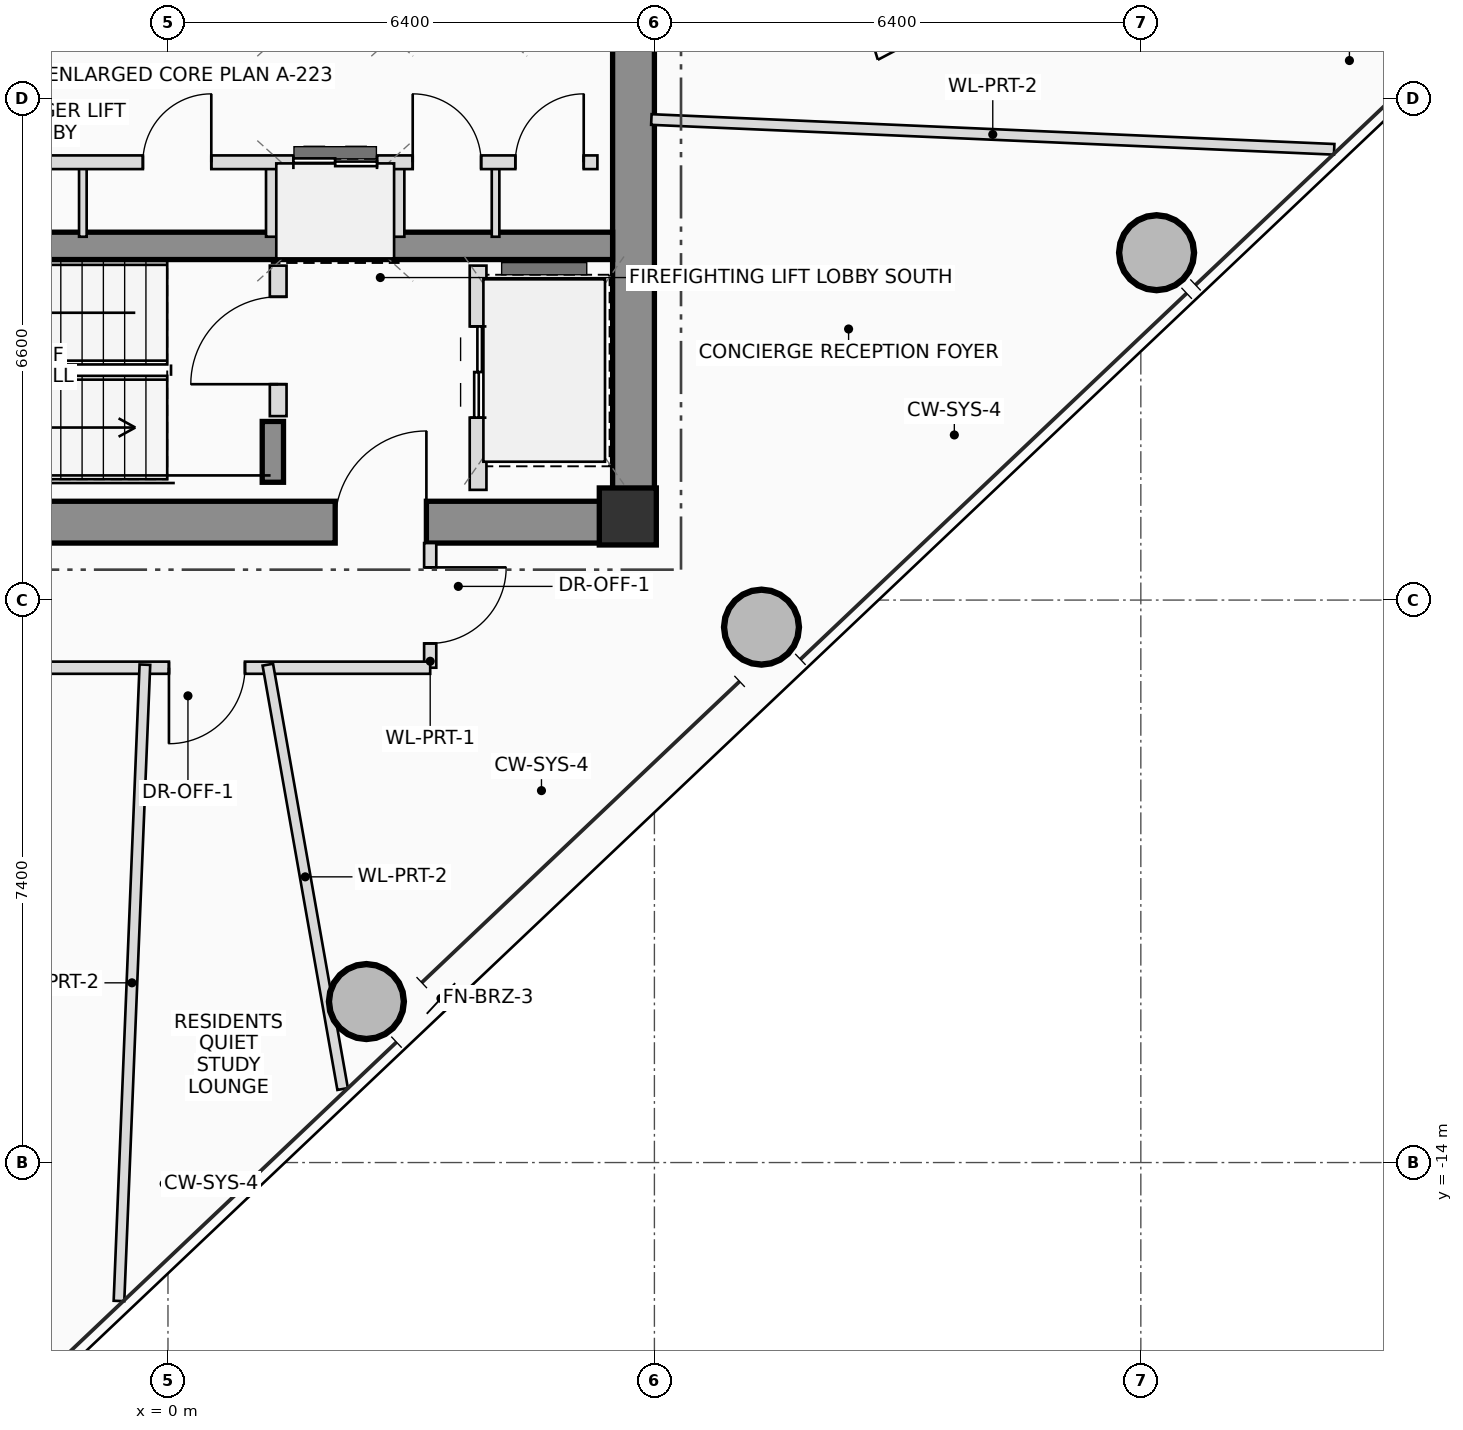
"""IFC4 building model, lengths in metres.
Left out: names, types, materials, properties, quantities, classifications, styles, units other than length and angle.
Written with IfcOpenShell. Run it as: python <this file> out.ifc"""

import sys

from ifc_helpers import new_model, si_unit, direction, frame, frame_2d, origin, origin_2d, place, context, subcontext, project, spatial, rectangle, hollow_circle, extrude, source, transform, mapped, element, fill, save


model = new_model("IFC4")
c1 = context("Model", 3, precision=1e-05, world=origin(), true_north=direction((0.0, 1.0)))
c2 = subcontext(c1, "Body", "Model", "MODEL_VIEW")
j1 = project(units=[si_unit("LENGTHUNIT", "METRE"), si_unit("PLANEANGLEUNIT", "RADIAN")], contexts=[c1])
p1 = place(None, origin())
s1 = spatial("IfcSite", under=j1, at=p1, CompositionType="ELEMENT")
p2 = place(p1, origin())
s2 = spatial("IfcBuilding", under=s1, at=p2, CompositionType="ELEMENT")
p3 = place(p2, frame((0.0, 0.0, 249.05)))
s3 = spatial("IfcBuildingStorey", under=s2, at=p3, CompositionType="ELEMENT", Elevation=249.05)
m1 = source(origin(), c2, "Body", "SweptSolid", [
    extrude(rectangle(XDim=0.75, YDim=0.75, at=origin_2d()), origin(), (0.0, 0.0, 1.0), 3.4),
])
p4 = place(p3, frame((6.05, -5.5, 0.0), z_axis=(0.0, 0.0, 1.0), x_axis=(1.0, 0.0, 0.0)))
e1 = element("IfcColumn", 1, at=p4, inside=s3, PredefinedType="COLUMN", context=c2, shape_type="MappedRepresentation", body=[
    mapped(m1, transform((0.0, 0.0, 0.0), scale=1.0)),
])
p5 = place(p3, frame((-6.4, -5.575, 0.0), z_axis=(0.0, 0.0, 1.0), x_axis=(1.0, 0.0, 0.0)))
e2 = element("IfcWall", 2, at=p5, inside=s3, PredefinedType="SHEAR", context=c2, shape_type="SweptSolid", body=[
    extrude(rectangle(XDim=12.8, YDim=0.55, at=frame_2d((6.4, 0.0))), origin(), (0.0, 0.0, 1.0), 3.4),
])
p6 = place(p5, frame((8.6, 0.0, 0.0)))
e3 = element("IfcOpeningElement", 3, at=p6, cuts=e2, PredefinedType="OPENING", context=c2, shape_type="SweptSolid", body=[
    extrude(rectangle(XDim=1.2, YDim=2.2, at=frame_2d((0.6, 1.1))), frame((0.0, 0.285, 0.0), z_axis=(0.0, -1.0, 0.0), x_axis=(1.0, 0.0, 0.0)), (0.0, 0.0, 1.0), 0.57),
])
p7 = place(p3, frame((6.125, -5.3, 0.0), z_axis=(0.0, 0.0, 1.0), x_axis=(0.0, 1.0, 0.0)))
e4 = element("IfcWall", 4, at=p7, inside=s3, PredefinedType="SHEAR", context=c2, shape_type="SweptSolid", body=[
    extrude(rectangle(XDim=10.6, YDim=0.55, at=frame_2d((5.3, 0.0))), origin(), (0.0, 0.0, 1.0), 3.4),
])
p8 = place(p3, frame((-5.85, -1.94, 0.0), z_axis=(0.0, 0.0, 1.0), x_axis=(1.0, 0.0, 0.0)))
e5 = element("IfcWall", 5, at=p8, inside=s3, PredefinedType="SHEAR", context=c2, shape_type="SweptSolid", body=[
    extrude(rectangle(XDim=11.7, YDim=0.36, at=frame_2d((5.85, 0.0))), origin(), (0.0, 0.0, 1.0), 3.4),
])
p9 = place(p3, frame((1.38, -5.05, 0.0), z_axis=(0.0, 0.0, 1.0), x_axis=(0.0, 1.0, 0.0)))
e6 = element("IfcWall", 6, at=p9, inside=s3, PredefinedType="SHEAR", context=c2, shape_type="SweptSolid", body=[
    extrude(rectangle(XDim=0.8, YDim=0.28, at=frame_2d((0.4, 0.0))), origin(), (0.0, 0.0, 1.0), 3.4),
])
m2 = source(origin(), c2, "Body", "SweptSolid", [
    extrude(hollow_circle(Radius=0.5, WallThickness=0.04, at=origin_2d()), origin(), (0.0, 0.0, 1.0), 3.4),
])
for number, where, z_axis, x_axis in (
    (7, (2.611, -11.882, 0.0), (0.0, 0.0, 1.0), (1.0, 0.0, 0.0)),
    (8, (7.809, -6.956, 0.0), (0.0, 0.0, 1.0), (1.0, 0.0, 0.0)),
    (9, (13.007, -2.03, 0.0), (0.0, 0.0, 1.0), (1.0, 0.0, 0.0)),
):
    element("IfcColumn", number, at=place(p3, frame(where, z_axis=z_axis, x_axis=x_axis)), inside=s3, PredefinedType="COLUMN", context=c2, shape_type="MappedRepresentation", body=[
        mapped(m2, transform((0.0, 0.0, 0.0), scale=1.0)),
    ])
p10 = place(p3, frame((1.45, -4.18, 0.0), z_axis=(0.0, 0.0, 1.0), x_axis=(0.0, 1.0, 0.0)))
e10 = element("IfcWall", 10, at=p10, inside=s3, PredefinedType="PLUMBINGWALL", context=c2, shape_type="SweptSolid", body=[
    extrude(rectangle(XDim=1.98, YDim=0.22, at=frame_2d((0.99, 0.0))), origin(), (0.0, 0.0, 1.0), 3.16),
])
p11 = place(p10, frame((0.42, 0.0, 0.0)))
e11 = element("IfcOpeningElement", 11, at=p11, cuts=e10, PredefinedType="OPENING", context=c2, shape_type="SweptSolid", body=[
    extrude(rectangle(XDim=1.15, YDim=2.15, at=frame_2d((0.575, 1.075))), frame((0.0, 0.12, 0.0), z_axis=(0.0, -1.0, 0.0), x_axis=(1.0, 0.0, 0.0)), (0.0, 0.0, 1.0), 0.24),
])
p12 = place(p3, frame((4.08, -5.15, 0.0), z_axis=(0.0, 0.0, 1.0), x_axis=(0.0, 1.0, 0.0)))
e12 = element("IfcWall", 12, at=p12, inside=s3, PredefinedType="PLUMBINGWALL", context=c2, shape_type="SweptSolid", body=[
    extrude(rectangle(XDim=2.95, YDim=0.22, at=frame_2d((1.475, 0.0))), origin(), (0.0, 0.0, 1.0), 3.16),
])
p13 = place(p12, frame((0.95, 0.0, 0.0)))
e13 = element("IfcOpeningElement", 13, at=p13, cuts=e12, PredefinedType="OPENING", context=c2, shape_type="SweptSolid", body=[
    extrude(rectangle(XDim=1.2, YDim=2.25, at=frame_2d((0.6, 1.125))), frame((0.0, 0.12, 0.0), z_axis=(0.0, -1.0, 0.0), x_axis=(1.0, 0.0, 0.0)), (0.0, 0.0, 1.0), 0.24),
])
p14 = place(p3, frame((-1.12, -1.82, 0.0), z_axis=(0.0, 0.0, 1.0), x_axis=(0.0, 1.0, 0.0)))
e14 = element("IfcWall", 14, at=p14, inside=s3, PredefinedType="PARTITIONING", context=c2, shape_type="SweptSolid", body=[
    extrude(rectangle(XDim=0.98, YDim=0.1, at=frame_2d((0.49, 0.0))), origin(), (0.0, 0.0, 1.0), 3.16),
])
for number, where, z_axis, x_axis in (
    (15, (1.38, -1.82, 0.0), (0.0, 0.0, 1.0), (0.0, 1.0, 0.0)),
    (16, (3.02, -1.82, 0.0), (0.0, 0.0, 1.0), (0.0, 1.0, 0.0)),
):
    element("IfcWall", number, at=place(p3, frame(where, z_axis=z_axis, x_axis=x_axis)), inside=s3, PredefinedType="PLUMBINGWALL", context=c2, shape_type="SweptSolid", body=[
        extrude(rectangle(XDim=0.98, YDim=0.18, at=frame_2d((0.49, 0.0))), origin(), (0.0, 0.0, 1.0), 3.16),
    ])
p15 = place(p3, frame((4.31, -1.82, 0.0), z_axis=(0.0, 0.0, 1.0), x_axis=(0.0, 1.0, 0.0)))
e17 = element("IfcWall", 17, at=p15, inside=s3, PredefinedType="PARTITIONING", context=c2, shape_type="SweptSolid", body=[
    extrude(rectangle(XDim=0.98, YDim=0.1, at=frame_2d((0.49, 0.0))), origin(), (0.0, 0.0, 1.0), 3.16),
])
p16 = place(p3, frame((-5.68, -0.84, 0.0), z_axis=(0.0, 0.0, 1.0), x_axis=(1.0, 0.0, 0.0)))
e18 = element("IfcWall", 18, at=p16, inside=s3, PredefinedType="PLUMBINGWALL", context=c2, shape_type="SweptSolid", body=[
    extrude(rectangle(XDim=11.33, YDim=0.18, at=frame_2d((5.665, 0.0))), origin(), (0.0, 0.0, 1.0), 3.16),
])
p17 = place(p16, frame((1.88, 0.0, 0.0)))
e19 = element("IfcOpeningElement", 19, at=p17, cuts=e18, PredefinedType="OPENING", context=c2, shape_type="SweptSolid", body=[
    extrude(rectangle(XDim=0.9, YDim=2.05, at=frame_2d((0.45, 1.025))), frame((0.0, 0.1, 0.0), z_axis=(0.0, -1.0, 0.0), x_axis=(1.0, 0.0, 0.0)), (0.0, 0.0, 1.0), 0.2),
])
p18 = place(p16, frame((5.35, 0.0, 0.0)))
e20 = element("IfcOpeningElement", 20, at=p18, cuts=e18, PredefinedType="OPENING", context=c2, shape_type="SweptSolid", body=[
    extrude(rectangle(XDim=0.9, YDim=2.05, at=frame_2d((0.45, 1.025))), frame((0.0, 0.1, 0.0), z_axis=(0.0, -1.0, 0.0), x_axis=(1.0, 0.0, 0.0)), (0.0, 0.0, 1.0), 0.2),
])
p19 = place(p16, frame((7.33, 0.0, 0.0)))
e21 = element("IfcOpeningElement", 21, at=p19, cuts=e18, PredefinedType="OPENING", context=c2, shape_type="SweptSolid", body=[
    extrude(rectangle(XDim=1.1, YDim=2.2, at=frame_2d((0.55, 1.1))), frame((0.0, 0.1, 0.0), z_axis=(0.0, -1.0, 0.0), x_axis=(1.0, 0.0, 0.0)), (0.0, 0.0, 1.0), 0.2),
])
p20 = place(p16, frame((8.9, 0.0, 0.0)))
e22 = element("IfcOpeningElement", 22, at=p20, cuts=e18, PredefinedType="OPENING", context=c2, shape_type="SweptSolid", body=[
    extrude(rectangle(XDim=0.9, YDim=2.05, at=frame_2d((0.45, 1.025))), frame((0.0, 0.1, 0.0), z_axis=(0.0, -1.0, 0.0), x_axis=(1.0, 0.0, 0.0)), (0.0, 0.0, 1.0), 0.2),
])
p21 = place(p16, frame((10.25, 0.0, 0.0)))
e23 = element("IfcOpeningElement", 23, at=p21, cuts=e18, PredefinedType="OPENING", context=c2, shape_type="SweptSolid", body=[
    extrude(rectangle(XDim=0.9, YDim=2.05, at=frame_2d((0.45, 1.025))), frame((0.0, 0.1, 0.0), z_axis=(0.0, -1.0, 0.0), x_axis=(1.0, 0.0, 0.0)), (0.0, 0.0, 1.0), 0.2),
])
p22 = place(p3, frame((3.45, -5.85, 0.0), z_axis=(0.0, 0.0, 1.0), x_axis=(0.0, -1.0, 0.0)))
e24 = element("IfcWall", 24, at=p22, inside=s3, PredefinedType="PARTITIONING", context=c2, shape_type="SweptSolid", body=[
    extrude(rectangle(XDim=1.64, YDim=0.16, at=frame_2d((0.82, 0.0))), origin(), (0.0, 0.0, 1.0), 3.16),
])
p23 = place(p22, frame((0.32, 0.0, 0.0)))
e25 = element("IfcOpeningElement", 25, at=p23, cuts=e24, PredefinedType="OPENING", context=c2, shape_type="SweptSolid", body=[
    extrude(rectangle(XDim=1.0, YDim=2.25, at=frame_2d((0.5, 1.125))), frame((0.0, 0.09, 0.0), z_axis=(0.0, -1.0, 0.0), x_axis=(1.0, 0.0, 0.0)), (0.0, 0.0, 1.0), 0.18),
])
p24 = place(p3, frame((3.45, -7.49, 0.0), z_axis=(0.0, 0.0, 1.0), x_axis=(-1.0, 0.0, 0.0)))
e26 = element("IfcWall", 26, at=p24, inside=s3, PredefinedType="PARTITIONING", context=c2, shape_type="SweptSolid", body=[
    extrude(rectangle(XDim=9.81, YDim=0.16, at=frame_2d((4.905, 0.0))), origin(), (0.0, 0.0, 1.0), 2.565),
])
p25 = place(p24, frame((2.437, 0.0, 0.0)))
e27 = element("IfcOpeningElement", 27, at=p25, cuts=e26, PredefinedType="OPENING", context=c2, shape_type="SweptSolid", body=[
    extrude(rectangle(XDim=1.0, YDim=2.25, at=frame_2d((0.5, 1.125))), frame((0.0, 0.09, 0.0), z_axis=(0.0, -1.0, 0.0), x_axis=(1.0, 0.0, 0.0)), (0.0, 0.0, 1.0), 0.18),
])
p26 = place(p24, frame((6.135, 0.0, 0.0)))
e28 = element("IfcOpeningElement", 28, at=p26, cuts=e26, PredefinedType="OPENING", context=c2, shape_type="SweptSolid", body=[
    extrude(rectangle(XDim=1.0, YDim=2.25, at=frame_2d((0.5, 1.125))), frame((0.0, 0.09, 0.0), z_axis=(0.0, -1.0, 0.0), x_axis=(1.0, 0.0, 0.0)), (0.0, 0.0, 1.0), 0.18),
])
p27 = place(p3, frame((6.36, -0.278, 0.0), z_axis=(0.0, 0.0, 1.0), x_axis=(0.99904773846, -0.043630451279, 0.0)))
e29 = element("IfcWall", 29, at=p27, inside=s3, PredefinedType="PARTITIONING", context=c2, shape_type="SweptSolid", body=[
    extrude(rectangle(XDim=8.992, YDim=0.14, at=frame_2d((4.496, 0.0))), origin(), (0.0, 0.0, 1.0), 2.725),
])
p28 = place(p3, frame((-0.304, -7.45, 0.0), z_axis=(0.0, 0.0, 1.0), x_axis=(-0.04070934235, -0.999171031128, 0.0)))
e30 = element("IfcWall", 30, at=p28, inside=s3, PredefinedType="PARTITIONING", context=c2, shape_type="SweptSolid", body=[
    extrude(rectangle(XDim=8.378, YDim=0.14, at=frame_2d((4.189, 0.0))), origin(), (0.0, 0.0, 1.0), 2.725),
])
p29 = place(p3, frame((1.314, -7.45, 0.0), z_axis=(0.0, 0.0, 1.0), x_axis=(0.173652657872, -0.984806963021, 0.0)))
e31 = element("IfcWall", 31, at=p29, inside=s3, PredefinedType="PARTITIONING", context=c2, shape_type="SweptSolid", body=[
    extrude(rectangle(XDim=5.669, YDim=0.14, at=frame_2d((2.834, 0.0))), origin(), (0.0, 0.0, 1.0), 2.725),
])
p30 = place(p6, origin())
e32 = element("IfcDoor", 32, at=p30, inside=s3, OperationType="SINGLE_SWING_RIGHT", PredefinedType="DOOR", context=c2, shape_type="SweptSolid", body=[
    extrude(rectangle(XDim=1.2, YDim=2.2, at=frame_2d((0.6, 1.1))), frame((0.0, 0.025, 0.0), z_axis=(0.0, -1.0, 0.0), x_axis=(1.0, 0.0, 0.0)), (0.0, 0.0, 1.0), 0.05),
])
fill(e3, e32)
p31 = place(p11, origin())
e33 = element("IfcDoor", 33, at=p31, inside=s3, OperationType="SINGLE_SWING_LEFT", PredefinedType="DOOR", context=c2, shape_type="SweptSolid", body=[
    extrude(rectangle(XDim=1.15, YDim=2.15, at=frame_2d((0.575, 1.075))), frame((0.0, 0.025, 0.0), z_axis=(0.0, -1.0, 0.0), x_axis=(1.0, 0.0, 0.0)), (0.0, 0.0, 1.0), 0.05),
])
fill(e11, e33)
p32 = place(p13, origin())
e34 = element("IfcDoor", 34, at=p32, inside=s3, OperationType="DOUBLE_DOOR_SLIDING", PredefinedType="DOOR", context=c2, shape_type="SweptSolid", body=[
    extrude(rectangle(XDim=1.2, YDim=2.25, at=frame_2d((0.6, 1.125))), frame((0.0, 0.025, 0.0), z_axis=(0.0, -1.0, 0.0), x_axis=(1.0, 0.0, 0.0)), (0.0, 0.0, 1.0), 0.05),
])
fill(e13, e34)
p33 = place(p18, origin())
e35 = element("IfcDoor", 35, at=p33, inside=s3, OperationType="SINGLE_SWING_RIGHT", PredefinedType="DOOR", context=c2, shape_type="SweptSolid", body=[
    extrude(rectangle(XDim=0.9, YDim=2.05, at=frame_2d((0.45, 1.025))), frame((0.0, 0.025, 0.0), z_axis=(0.0, -1.0, 0.0), x_axis=(1.0, 0.0, 0.0)), (0.0, 0.0, 1.0), 0.05),
])
fill(e20, e35)
p34 = place(p19, origin())
e36 = element("IfcDoor", 36, at=p34, inside=s3, OperationType="DOUBLE_DOOR_SLIDING", PredefinedType="DOOR", context=c2, shape_type="SweptSolid", body=[
    extrude(rectangle(XDim=1.1, YDim=2.2, at=frame_2d((0.55, 1.1))), frame((0.0, 0.025, 0.0), z_axis=(0.0, -1.0, 0.0), x_axis=(1.0, 0.0, 0.0)), (0.0, 0.0, 1.0), 0.05),
])
fill(e21, e36)
p35 = place(p20, origin())
e37 = element("IfcDoor", 37, at=p35, inside=s3, OperationType="SINGLE_SWING_LEFT", PredefinedType="DOOR", context=c2, shape_type="SweptSolid", body=[
    extrude(rectangle(XDim=0.9, YDim=2.05, at=frame_2d((0.45, 1.025))), frame((0.0, 0.025, 0.0), z_axis=(0.0, -1.0, 0.0), x_axis=(1.0, 0.0, 0.0)), (0.0, 0.0, 1.0), 0.05),
])
fill(e22, e37)
p36 = place(p21, origin())
e38 = element("IfcDoor", 38, at=p36, inside=s3, OperationType="SINGLE_SWING_RIGHT", PredefinedType="DOOR", context=c2, shape_type="SweptSolid", body=[
    extrude(rectangle(XDim=0.9, YDim=2.05, at=frame_2d((0.45, 1.025))), frame((0.0, 0.025, 0.0), z_axis=(0.0, -1.0, 0.0), x_axis=(1.0, 0.0, 0.0)), (0.0, 0.0, 1.0), 0.05),
])
fill(e23, e38)
p37 = place(p23, origin())
e39 = element("IfcDoor", 39, at=p37, inside=s3, OperationType="SINGLE_SWING_LEFT", PredefinedType="DOOR", context=c2, shape_type="SweptSolid", body=[
    extrude(rectangle(XDim=1.0, YDim=2.25, at=frame_2d((0.5, 1.125))), frame((0.0, 0.025, 0.0), z_axis=(0.0, -1.0, 0.0), x_axis=(1.0, 0.0, 0.0)), (0.0, 0.0, 1.0), 0.05),
])
fill(e25, e39)
p38 = place(p25, origin())
e40 = element("IfcDoor", 40, at=p38, inside=s3, OperationType="SINGLE_SWING_RIGHT", PredefinedType="DOOR", context=c2, shape_type="SweptSolid", body=[
    extrude(rectangle(XDim=1.0, YDim=2.25, at=frame_2d((0.5, 1.125))), frame((0.0, 0.025, 0.0), z_axis=(0.0, -1.0, 0.0), x_axis=(1.0, 0.0, 0.0)), (0.0, 0.0, 1.0), 0.05),
])
fill(e27, e40)
save(model, sys.argv[1])
